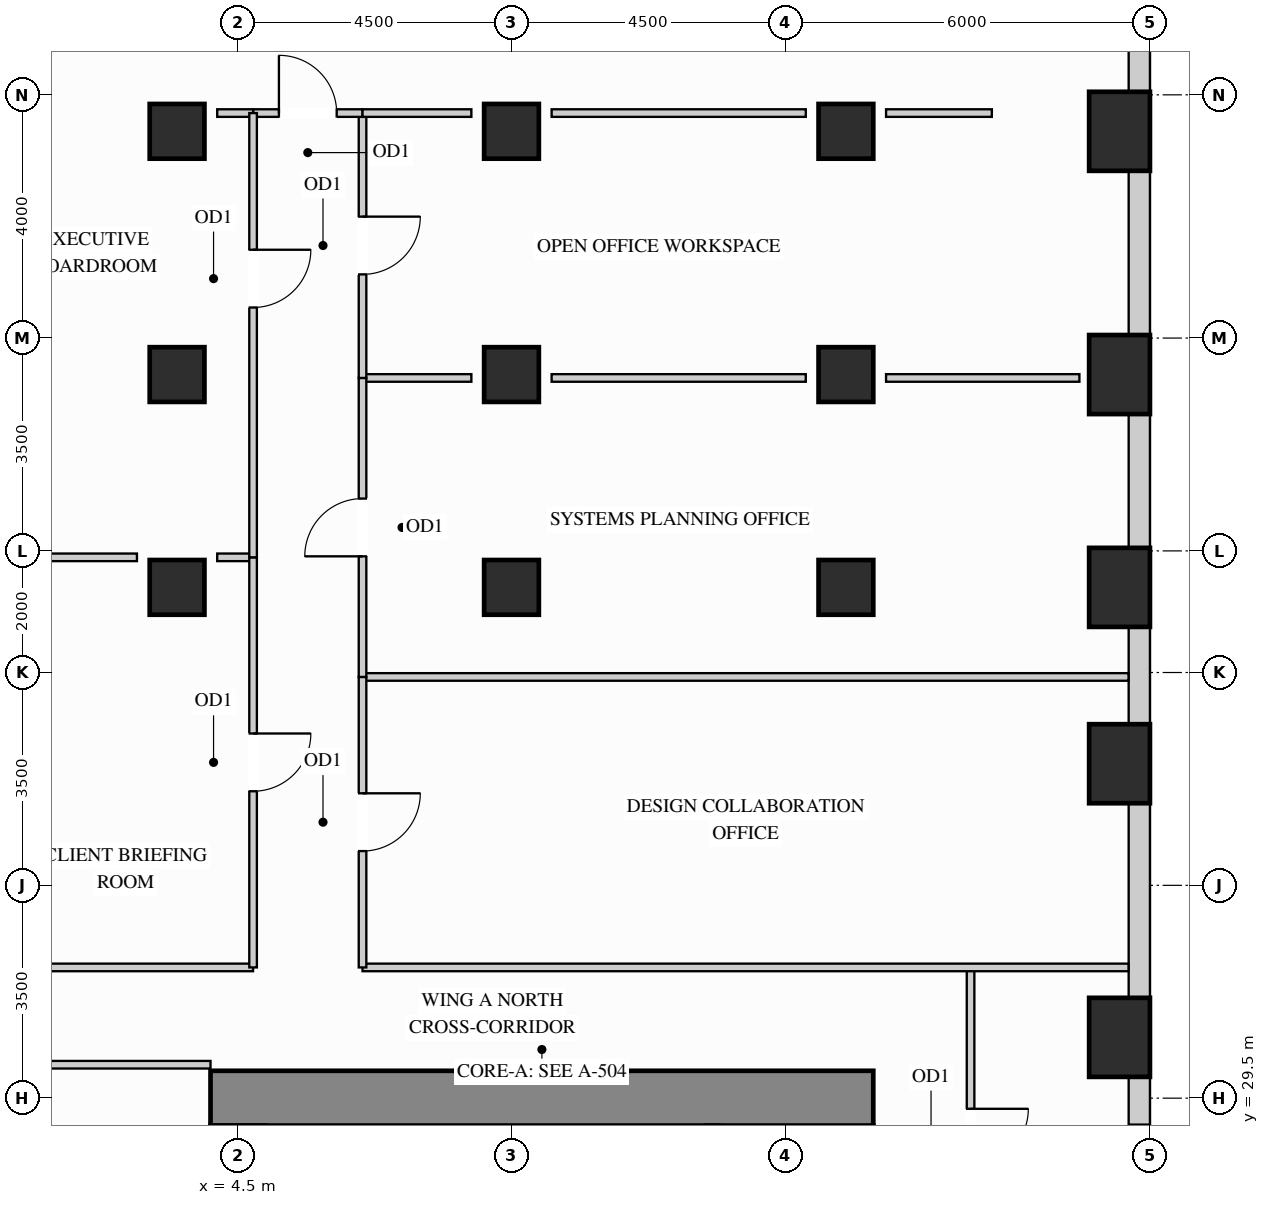
"""IFC4 building model, lengths in metres.
Left out: names, types, materials, properties, quantities, classifications, styles, units other than length and angle.
Written with IfcOpenShell. Run it as: python <this file> out.ifc"""

import sys

from ifc_helpers import new_model, si_unit, direction, frame, frame_2d, origin, origin_2d, place, context, subcontext, project, spatial, rectangle, extrude, source, transform, mapped, element, fill, save


model = new_model("IFC4")
c1 = context("Model", 3, precision=1e-05, world=origin(), true_north=direction((0.0, 1.0)))
c2 = subcontext(c1, "Body", "Model", "MODEL_VIEW")
j1 = project(units=[si_unit("LENGTHUNIT", "METRE"), si_unit("PLANEANGLEUNIT", "RADIAN")], contexts=[c1])
p1 = place(None, origin())
s1 = spatial("IfcSite", under=j1, at=p1, CompositionType="ELEMENT")
p2 = place(p1, origin())
s2 = spatial("IfcBuilding", under=s1, at=p2, CompositionType="ELEMENT")
p3 = place(p2, frame((0.0, 0.0, 65.7)))
s3 = spatial("IfcBuildingStorey", under=s2, at=p3, CompositionType="ELEMENT", Elevation=65.7)
m1 = source(origin(), c2, "Body", "SweptSolid", [
    extrude(rectangle(XDim=0.9, YDim=0.9, at=origin_2d()), origin(), (0.0, 0.0, 1.0), 3.38),
])
for number, where, z_axis, x_axis in (
    (1, (14.5, 37.9, 0.0), (0.0, 0.0, 1.0), (1.0, 0.0, 0.0)),
    (2, (14.5, 41.4, 0.0), (0.0, 0.0, 1.0), (1.0, 0.0, 0.0)),
    (3, (14.5, 45.4, 0.0), (0.0, 0.0, 1.0), (1.0, 0.0, 0.0)),
    (4, (3.5, 37.9, 0.0), (0.0, 0.0, 1.0), (1.0, 0.0, 0.0)),
    (5, (3.5, 41.4, 0.0), (0.0, 0.0, 1.0), (1.0, 0.0, 0.0)),
    (6, (3.5, 45.4, 0.0), (0.0, 0.0, 1.0), (1.0, 0.0, 0.0)),
    (7, (9.0, 37.9, 0.0), (0.0, 0.0, 1.0), (1.0, 0.0, 0.0)),
    (8, (9.0, 41.4, 0.0), (0.0, 0.0, 1.0), (1.0, 0.0, 0.0)),
    (9, (9.0, 45.4, 0.0), (0.0, 0.0, 1.0), (1.0, 0.0, 0.0)),
):
    element("IfcColumn", number, at=place(p3, frame(where, z_axis=z_axis, x_axis=x_axis)), inside=s3, PredefinedType="COLUMN", context=c2, shape_type="MappedRepresentation", body=[
        mapped(m1, transform((0.0, 0.0, 0.0), x_axis=(1.0, 0.0, 0.0), y_axis=(0.0, 1.0, 0.0), z_axis=(0.0, 0.0, 1.0))),
    ])
m2 = source(origin(), c2, "Body", "SweptSolid", [
    extrude(rectangle(XDim=1.0, YDim=1.3, at=origin_2d()), origin(), (0.0, 0.0, 1.0), 3.38),
])
for number, where, z_axis, x_axis in (
    (10, (19.0, 30.5, 0.0), (0.0, 0.0, 1.0), (1.0, 0.0, 0.0)),
    (11, (19.0, 35.0, 0.0), (0.0, 0.0, 1.0), (1.0, 0.0, 0.0)),
    (12, (19.0, 37.9, 0.0), (0.0, 0.0, 1.0), (1.0, 0.0, 0.0)),
    (13, (19.0, 41.4, 0.0), (0.0, 0.0, 1.0), (1.0, 0.0, 0.0)),
    (14, (19.0, 45.4, 0.0), (0.0, 0.0, 1.0), (1.0, 0.0, 0.0)),
):
    element("IfcColumn", number, at=place(p3, frame(where, z_axis=z_axis, x_axis=x_axis)), inside=s3, PredefinedType="COLUMN", context=c2, shape_type="MappedRepresentation", body=[
        mapped(m2, transform((0.0, 0.0, 0.0), x_axis=(1.0, 0.0, 0.0), y_axis=(0.0, 1.0, 0.0), z_axis=(0.0, 0.0, 1.0))),
    ])
m3 = source(origin(), c2, "Body", "SweptSolid", [
    extrude(rectangle(XDim=10.9, YDim=0.9, at=frame_2d((5.45, 0.0))), origin(), (0.0, 0.0, 1.0), 3.38),
])
p4 = place(p3, frame((4.05, 29.5, 0.0), z_axis=(0.0, 0.0, 1.0), x_axis=(1.0, 0.0, 0.0)))
e15 = element("IfcWall", 15, at=p4, inside=s3, PredefinedType="SHEAR", context=c2, shape_type="MappedRepresentation", body=[
    mapped(m3, transform((0.0, 0.0, 0.0), x_axis=(1.0, 0.0, 0.0), y_axis=(0.0, 1.0, 0.0), z_axis=(0.0, 0.0, 1.0))),
])
p5 = place(p3, frame((19.325, 27.448, 0.0), z_axis=(0.0, 0.0, 1.0), x_axis=(0.0, 1.0, 0.0)))
e16 = element("IfcWall", 16, at=p5, inside=s3, PredefinedType="SOLIDWALL", context=c2, shape_type="SweptSolid", body=[
    extrude(rectangle(XDim=2.404, YDim=0.35, at=frame_2d((1.202, 0.0))), origin(), (0.0, 0.0, 1.0), 2.51),
])
p6 = place(p5, frame((0.417, 0.0, 0.78)))
e17 = element("IfcOpeningElement", 17, at=p6, cuts=e16, PredefinedType="OPENING", context=c2, shape_type="SweptSolid", body=[
    extrude(rectangle(XDim=1.2, YDim=1.55, at=frame_2d((0.6, 0.775))), frame((0.0, 0.185, 0.0), z_axis=(0.0, -1.0, 0.0), x_axis=(1.0, 0.0, 0.0)), (0.0, 0.0, 1.0), 0.37),
])
m4 = source(origin(), c2, "Body", "SweptSolid", [
    extrude(rectangle(XDim=3.204, YDim=0.35, at=frame_2d((1.602, 0.0))), origin(), (0.0, 0.0, 1.0), 2.51),
])
p7 = place(p3, frame((19.325, 31.148, 0.0), z_axis=(0.0, 0.0, 1.0), x_axis=(0.0, 1.0, 0.0)))
e18 = element("IfcWall", 18, at=p7, inside=s3, PredefinedType="SOLIDWALL", context=c2, shape_type="MappedRepresentation", body=[
    mapped(m4, transform((0.0, 0.0, 0.0), x_axis=(1.0, 0.0, 0.0), y_axis=(0.0, 1.0, 0.0), z_axis=(0.0, 0.0, 1.0))),
])
m5 = source(origin(), c2, "Body", "SweptSolid", [
    extrude(rectangle(XDim=1.604, YDim=0.35, at=frame_2d((0.802, 0.0))), origin(), (0.0, 0.0, 1.0), 2.51),
])
p8 = place(p3, frame((19.325, 35.648, 0.0), z_axis=(0.0, 0.0, 1.0), x_axis=(0.0, 1.0, 0.0)))
e19 = element("IfcWall", 19, at=p8, inside=s3, PredefinedType="SOLIDWALL", context=c2, shape_type="MappedRepresentation", body=[
    mapped(m5, transform((0.0, 0.0, 0.0), x_axis=(1.0, 0.0, 0.0), y_axis=(0.0, 1.0, 0.0), z_axis=(0.0, 0.0, 1.0))),
])
m6 = source(origin(), c2, "Body", "SweptSolid", [
    extrude(rectangle(XDim=2.204, YDim=0.35, at=frame_2d((1.102, 0.0))), origin(), (0.0, 0.0, 1.0), 2.51),
])
p9 = place(p3, frame((19.325, 38.548, 0.0), z_axis=(0.0, 0.0, 1.0), x_axis=(0.0, 1.0, 0.0)))
e20 = element("IfcWall", 20, at=p9, inside=s3, PredefinedType="SOLIDWALL", context=c2, shape_type="MappedRepresentation", body=[
    mapped(m6, transform((0.0, 0.0, 0.0), x_axis=(1.0, 0.0, 0.0), y_axis=(0.0, 1.0, 0.0), z_axis=(0.0, 0.0, 1.0))),
])
m7 = source(origin(), c2, "Body", "SweptSolid", [
    extrude(rectangle(XDim=2.704, YDim=0.35, at=frame_2d((1.352, 0.0))), origin(), (0.0, 0.0, 1.0), 2.51),
])
p10 = place(p3, frame((19.325, 42.048, 0.0), z_axis=(0.0, 0.0, 1.0), x_axis=(0.0, 1.0, 0.0)))
e21 = element("IfcWall", 21, at=p10, inside=s3, PredefinedType="SOLIDWALL", context=c2, shape_type="MappedRepresentation", body=[
    mapped(m7, transform((0.0, 0.0, 0.0), x_axis=(1.0, 0.0, 0.0), y_axis=(0.0, 1.0, 0.0), z_axis=(0.0, 0.0, 1.0))),
])
m8 = source(origin(), c2, "Body", "SweptSolid", [
    extrude(rectangle(XDim=1.104, YDim=0.35, at=frame_2d((0.552, 0.0))), origin(), (0.0, 0.0, 1.0), 3.365),
])
p11 = place(p3, frame((19.325, 46.048, 0.0), z_axis=(0.0, 0.0, 1.0), x_axis=(0.0, 1.0, 0.0)))
e22 = element("IfcWall", 22, at=p11, inside=s3, PredefinedType="SOLIDWALL", context=c2, shape_type="MappedRepresentation", body=[
    mapped(m8, transform((0.0, 0.0, 0.0), x_axis=(1.0, 0.0, 0.0), y_axis=(0.0, 1.0, 0.0), z_axis=(0.0, 0.0, 1.0))),
])
p12 = place(p3, frame((16.55, 26.05, 0.0), z_axis=(0.0, 0.0, 1.0), x_axis=(0.0, 1.0, 0.0)))
e23 = element("IfcWall", 23, at=p12, inside=s3, PredefinedType="PARTITIONING", context=c2, shape_type="SweptSolid", body=[
    extrude(rectangle(XDim=5.6, YDim=0.125, at=frame_2d((2.8, 0.0))), origin(), (0.0, 0.0, 1.0), 3.365),
])
p13 = place(p12, frame((2.325, 0.0, 0.0)))
e24 = element("IfcOpeningElement", 24, at=p13, cuts=e23, PredefinedType="OPENING", context=c2, shape_type="SweptSolid", body=[
    extrude(rectangle(XDim=0.95, YDim=2.15, at=frame_2d((0.475, 1.075))), frame((0.0, 0.073, 0.0), z_axis=(0.0, -1.0, 0.0), x_axis=(1.0, 0.0, 0.0)), (0.0, 0.0, 1.0), 0.145),
])
m9 = source(origin(), c2, "Body", "SweptSolid", [
    extrude(rectangle(XDim=12.598, YDim=0.125, at=frame_2d((6.299, 0.0))), origin(), (0.0, 0.0, 1.0), 2.828),
])
p14 = place(p3, frame((6.55, 36.427, 0.0), z_axis=(0.0, 0.0, 1.0), x_axis=(1.0, 0.0, 0.0)))
e25 = element("IfcWall", 25, at=p14, inside=s3, PredefinedType="PARTITIONING", context=c2, shape_type="MappedRepresentation", body=[
    mapped(m9, transform((0.0, 0.0, 0.0), x_axis=(1.0, 0.0, 0.0), y_axis=(0.0, 1.0, 0.0), z_axis=(0.0, 0.0, 1.0))),
])
m10 = source(origin(), c2, "Body", "SweptSolid", [
    extrude(rectangle(XDim=1.79, YDim=0.125, at=frame_2d((0.895, 0.0))), origin(), (0.0, 0.0, 1.0), 2.67),
])
p15 = place(p3, frame((6.55, 41.344, 0.0), z_axis=(0.0, 0.0, 1.0), x_axis=(1.0, 0.0, 0.0)))
e26 = element("IfcWall", 26, at=p15, inside=s3, PredefinedType="PARTITIONING", context=c2, shape_type="MappedRepresentation", body=[
    mapped(m10, transform((0.0, 0.0, 0.0), x_axis=(1.0, 0.0, 0.0), y_axis=(0.0, 1.0, 0.0), z_axis=(0.0, 0.0, 1.0))),
])
m11 = source(origin(), c2, "Body", "SweptSolid", [
    extrude(rectangle(XDim=4.18, YDim=0.125, at=frame_2d((2.09, 0.0))), origin(), (0.0, 0.0, 1.0), 2.67),
])
p16 = place(p3, frame((9.66, 41.344, 0.0), z_axis=(0.0, 0.0, 1.0), x_axis=(1.0, 0.0, 0.0)))
e27 = element("IfcWall", 27, at=p16, inside=s3, PredefinedType="PARTITIONING", context=c2, shape_type="MappedRepresentation", body=[
    mapped(m11, transform((0.0, 0.0, 0.0), x_axis=(1.0, 0.0, 0.0), y_axis=(0.0, 1.0, 0.0), z_axis=(0.0, 0.0, 1.0))),
])
m12 = source(origin(), c2, "Body", "SweptSolid", [
    extrude(rectangle(XDim=3.18, YDim=0.125, at=frame_2d((1.59, 0.0))), origin(), (0.0, 0.0, 1.0), 2.67),
])
p17 = place(p3, frame((15.16, 41.344, 0.0), z_axis=(0.0, 0.0, 1.0), x_axis=(1.0, 0.0, 0.0)))
e28 = element("IfcWall", 28, at=p17, inside=s3, PredefinedType="PARTITIONING", context=c2, shape_type="MappedRepresentation", body=[
    mapped(m12, transform((0.0, 0.0, 0.0), x_axis=(1.0, 0.0, 0.0), y_axis=(0.0, 1.0, 0.0), z_axis=(0.0, 0.0, 1.0))),
])
p18 = place(p3, frame((6.55, 31.65, 0.0), z_axis=(0.0, 0.0, 1.0), x_axis=(1.0, 0.0, 0.0)))
e29 = element("IfcWall", 29, at=p18, inside=s3, PredefinedType="PARTITIONING", context=c2, shape_type="MappedRepresentation", body=[
    mapped(m9, transform((0.0, 0.0, 0.0), x_axis=(1.0, 0.0, 0.0), y_axis=(0.0, 1.0, 0.0), z_axis=(0.0, 0.0, 1.0))),
])
m13 = source(origin(), c2, "Body", "SweptSolid", [
    extrude(rectangle(XDim=4.398, YDim=0.125, at=frame_2d((2.199, 0.0))), origin(), (0.0, 0.0, 1.0), 2.828),
])
p19 = place(p3, frame((0.352, 31.65, 0.0), z_axis=(0.0, 0.0, 1.0), x_axis=(1.0, 0.0, 0.0)))
e30 = element("IfcWall", 30, at=p19, inside=s3, PredefinedType="PARTITIONING", context=c2, shape_type="MappedRepresentation", body=[
    mapped(m13, transform((0.0, 0.0, 0.0), x_axis=(1.0, 0.0, 0.0), y_axis=(0.0, 1.0, 0.0), z_axis=(0.0, 0.0, 1.0))),
])
m14 = source(origin(), c2, "Body", "SweptSolid", [
    extrude(rectangle(XDim=1.58, YDim=0.125, at=frame_2d((0.79, 0.0))), origin(), (0.0, 0.0, 1.0), 3.365),
])
p20 = place(p3, frame((1.26, 38.394, 0.0), z_axis=(0.0, 0.0, 1.0), x_axis=(1.0, 0.0, 0.0)))
e31 = element("IfcWall", 31, at=p20, inside=s3, PredefinedType="PARTITIONING", context=c2, shape_type="MappedRepresentation", body=[
    mapped(m14, transform((0.0, 0.0, 0.0), x_axis=(1.0, 0.0, 0.0), y_axis=(0.0, 1.0, 0.0), z_axis=(0.0, 0.0, 1.0))),
])
m15 = source(origin(), c2, "Body", "SweptSolid", [
    extrude(rectangle(XDim=0.59, YDim=0.125, at=frame_2d((0.295, 0.0))), origin(), (0.0, 0.0, 1.0), 3.365),
])
p21 = place(p3, frame((4.16, 38.394, 0.0), z_axis=(0.0, 0.0, 1.0), x_axis=(1.0, 0.0, 0.0)))
e32 = element("IfcWall", 32, at=p21, inside=s3, PredefinedType="PARTITIONING", context=c2, shape_type="MappedRepresentation", body=[
    mapped(m15, transform((0.0, 0.0, 0.0), x_axis=(1.0, 0.0, 0.0), y_axis=(0.0, 1.0, 0.0), z_axis=(0.0, 0.0, 1.0))),
])
m16 = source(origin(), c2, "Body", "SweptSolid", [
    extrude(rectangle(XDim=2.79, YDim=0.125, at=frame_2d((1.395, 0.0))), origin(), (0.0, 0.0, 1.0), 3.365),
])
p22 = place(p3, frame((1.26, 30.05, 0.0), z_axis=(0.0, 0.0, 1.0), x_axis=(1.0, 0.0, 0.0)))
e33 = element("IfcWall", 33, at=p22, inside=s3, PredefinedType="PARTITIONING", context=c2, shape_type="MappedRepresentation", body=[
    mapped(m16, transform((0.0, 0.0, 0.0), x_axis=(1.0, 0.0, 0.0), y_axis=(0.0, 1.0, 0.0), z_axis=(0.0, 0.0, 1.0))),
])
p23 = place(p3, frame((6.55, 31.65, 0.0), z_axis=(0.0, 0.0, 1.0), x_axis=(0.0, 1.0, 0.0)))
e34 = element("IfcWall", 34, at=p23, inside=s3, PredefinedType="PARTITIONING", context=c2, shape_type="SweptSolid", body=[
    extrude(rectangle(XDim=4.777, YDim=0.125, at=frame_2d((2.389, 0.0))), origin(), (0.0, 0.0, 1.0), 3.365),
])
p24 = place(p23, frame((1.914, 0.0, 0.0)))
e35 = element("IfcOpeningElement", 35, at=p24, cuts=e34, PredefinedType="OPENING", context=c2, shape_type="SweptSolid", body=[
    extrude(rectangle(XDim=0.95, YDim=2.15, at=frame_2d((0.475, 1.075))), frame((0.0, 0.073, 0.0), z_axis=(0.0, -1.0, 0.0), x_axis=(1.0, 0.0, 0.0)), (0.0, 0.0, 1.0), 0.145),
])
p25 = place(p3, frame((6.55, 36.427, 0.0), z_axis=(0.0, 0.0, 1.0), x_axis=(0.0, 1.0, 0.0)))
e36 = element("IfcWall", 36, at=p25, inside=s3, PredefinedType="PARTITIONING", context=c2, shape_type="SweptSolid", body=[
    extrude(rectangle(XDim=4.917, YDim=0.125, at=frame_2d((2.458, 0.0))), origin(), (0.0, 0.0, 1.0), 3.365),
])
p26 = place(p25, frame((1.983, 0.0, 0.0)))
e37 = element("IfcOpeningElement", 37, at=p26, cuts=e36, PredefinedType="OPENING", context=c2, shape_type="SweptSolid", body=[
    extrude(rectangle(XDim=0.95, YDim=2.15, at=frame_2d((0.475, 1.075))), frame((0.0, 0.073, 0.0), z_axis=(0.0, -1.0, 0.0), x_axis=(1.0, 0.0, 0.0)), (0.0, 0.0, 1.0), 0.145),
])
p27 = place(p3, frame((6.55, 41.344, 0.0), z_axis=(0.0, 0.0, 1.0), x_axis=(0.0, 1.0, 0.0)))
e38 = element("IfcWall", 38, at=p27, inside=s3, PredefinedType="PARTITIONING", context=c2, shape_type="SweptSolid", body=[
    extrude(rectangle(XDim=4.356, YDim=0.125, at=frame_2d((2.178, 0.0))), origin(), (0.0, 0.0, 1.0), 3.365),
])
p28 = place(p27, frame((1.703, 0.0, 0.0)))
e39 = element("IfcOpeningElement", 39, at=p28, cuts=e38, PredefinedType="OPENING", context=c2, shape_type="SweptSolid", body=[
    extrude(rectangle(XDim=0.95, YDim=2.15, at=frame_2d((0.475, 1.075))), frame((0.0, 0.073, 0.0), z_axis=(0.0, -1.0, 0.0), x_axis=(1.0, 0.0, 0.0)), (0.0, 0.0, 1.0), 0.145),
])
p29 = place(p3, frame((4.75, 45.7, 0.0), z_axis=(0.0, 0.0, 1.0), x_axis=(1.0, 0.0, 0.0)))
e40 = element("IfcWall", 40, at=p29, inside=s3, PredefinedType="PARTITIONING", context=c2, shape_type="SweptSolid", body=[
    extrude(rectangle(XDim=1.8, YDim=0.125, at=frame_2d((0.9, 0.0))), origin(), (0.0, 0.0, 1.0), 2.67),
])
p30 = place(p29, frame((0.425, 0.0, 0.0)))
e41 = element("IfcOpeningElement", 41, at=p30, cuts=e40, PredefinedType="OPENING", context=c2, shape_type="SweptSolid", body=[
    extrude(rectangle(XDim=0.95, YDim=2.15, at=frame_2d((0.475, 1.075))), frame((0.0, 0.073, 0.0), z_axis=(0.0, -1.0, 0.0), x_axis=(1.0, 0.0, 0.0)), (0.0, 0.0, 1.0), 0.145),
])
p31 = place(p3, frame((6.55, 45.7, 0.0), z_axis=(0.0, 0.0, 1.0), x_axis=(1.0, 0.0, 0.0)))
e42 = element("IfcWall", 42, at=p31, inside=s3, PredefinedType="PARTITIONING", context=c2, shape_type="MappedRepresentation", body=[
    mapped(m10, transform((0.0, 0.0, 0.0), x_axis=(1.0, 0.0, 0.0), y_axis=(0.0, 1.0, 0.0), z_axis=(0.0, 0.0, 1.0))),
])
p32 = place(p3, frame((9.66, 45.7, 0.0), z_axis=(0.0, 0.0, 1.0), x_axis=(1.0, 0.0, 0.0)))
e43 = element("IfcWall", 43, at=p32, inside=s3, PredefinedType="PARTITIONING", context=c2, shape_type="MappedRepresentation", body=[
    mapped(m11, transform((0.0, 0.0, 0.0), x_axis=(1.0, 0.0, 0.0), y_axis=(0.0, 1.0, 0.0), z_axis=(0.0, 0.0, 1.0))),
])
m17 = source(origin(), c2, "Body", "SweptSolid", [
    extrude(rectangle(XDim=1.74, YDim=0.125, at=frame_2d((0.87, 0.0))), origin(), (0.0, 0.0, 1.0), 2.67),
])
p33 = place(p3, frame((15.16, 45.7, 0.0), z_axis=(0.0, 0.0, 1.0), x_axis=(1.0, 0.0, 0.0)))
e44 = element("IfcWall", 44, at=p33, inside=s3, PredefinedType="PARTITIONING", context=c2, shape_type="MappedRepresentation", body=[
    mapped(m17, transform((0.0, 0.0, 0.0), x_axis=(1.0, 0.0, 0.0), y_axis=(0.0, 1.0, 0.0), z_axis=(0.0, 0.0, 1.0))),
])
m18 = source(origin(), c2, "Body", "SweptSolid", [
    extrude(rectangle(XDim=0.59, YDim=0.125, at=frame_2d((0.295, 0.0))), origin(), (0.0, 0.0, 1.0), 2.67),
])
p34 = place(p3, frame((4.16, 45.7, 0.0), z_axis=(0.0, 0.0, 1.0), x_axis=(1.0, 0.0, 0.0)))
e45 = element("IfcWall", 45, at=p34, inside=s3, PredefinedType="PARTITIONING", context=c2, shape_type="MappedRepresentation", body=[
    mapped(m18, transform((0.0, 0.0, 0.0), x_axis=(1.0, 0.0, 0.0), y_axis=(0.0, 1.0, 0.0), z_axis=(0.0, 0.0, 1.0))),
])
p35 = place(p3, frame((4.75, 31.65, 0.0), z_axis=(0.0, 0.0, 1.0), x_axis=(0.0, 1.0, 0.0)))
e46 = element("IfcWall", 46, at=p35, inside=s3, PredefinedType="PARTITIONING", context=c2, shape_type="SweptSolid", body=[
    extrude(rectangle(XDim=6.744, YDim=0.125, at=frame_2d((3.372, 0.0))), origin(), (0.0, 0.0, 1.0), 3.365),
])
p36 = place(p35, frame((2.897, 0.0, 0.0)))
e47 = element("IfcOpeningElement", 47, at=p36, cuts=e46, PredefinedType="OPENING", context=c2, shape_type="SweptSolid", body=[
    extrude(rectangle(XDim=0.95, YDim=2.15, at=frame_2d((0.475, 1.075))), frame((0.0, 0.073, 0.0), z_axis=(0.0, -1.0, 0.0), x_axis=(1.0, 0.0, 0.0)), (0.0, 0.0, 1.0), 0.145),
])
p37 = place(p3, frame((4.75, 38.394, 0.0), z_axis=(0.0, 0.0, 1.0), x_axis=(0.0, 1.0, 0.0)))
e48 = element("IfcWall", 48, at=p37, inside=s3, PredefinedType="PARTITIONING", context=c2, shape_type="SweptSolid", body=[
    extrude(rectangle(XDim=7.306, YDim=0.125, at=frame_2d((3.653, 0.0))), origin(), (0.0, 0.0, 1.0), 3.365),
])
p38 = place(p37, frame((4.108, 0.0, 0.0)))
e49 = element("IfcOpeningElement", 49, at=p38, cuts=e48, PredefinedType="OPENING", context=c2, shape_type="SweptSolid", body=[
    extrude(rectangle(XDim=0.95, YDim=2.15, at=frame_2d((0.475, 1.075))), frame((0.0, 0.073, 0.0), z_axis=(0.0, -1.0, 0.0), x_axis=(1.0, 0.0, 0.0)), (0.0, 0.0, 1.0), 0.145),
])
m19 = source(origin(), c2, "Body", "SweptSolid", [
    extrude(rectangle(XDim=0.95, YDim=2.15, at=frame_2d((0.475, 1.075))), frame((0.0, 0.025, 0.0), z_axis=(0.0, -1.0, 0.0), x_axis=(1.0, 0.0, 0.0)), (0.0, 0.0, 1.0), 0.05),
])
p39 = place(p13, origin())
e50 = element("IfcDoor", 50, at=p39, inside=s3, OperationType="SINGLE_SWING_RIGHT", PredefinedType="DOOR", context=c2, shape_type="MappedRepresentation", body=[
    mapped(m19, transform((0.0, 0.0, 0.0), x_axis=(1.0, 0.0, 0.0), y_axis=(0.0, 1.0, 0.0), z_axis=(0.0, 0.0, 1.0))),
])
fill(e24, e50)
p40 = place(p24, origin())
e51 = element("IfcDoor", 51, at=p40, inside=s3, OperationType="SINGLE_SWING_RIGHT", PredefinedType="DOOR", context=c2, shape_type="MappedRepresentation", body=[
    mapped(m19, transform((0.0, 0.0, 0.0), x_axis=(1.0, 0.0, 0.0), y_axis=(0.0, 1.0, 0.0), z_axis=(0.0, 0.0, 1.0))),
])
fill(e35, e51)
p41 = place(p26, origin())
e52 = element("IfcDoor", 52, at=p41, inside=s3, OperationType="SINGLE_SWING_LEFT", PredefinedType="DOOR", context=c2, shape_type="MappedRepresentation", body=[
    mapped(m19, transform((0.0, 0.0, 0.0), x_axis=(1.0, 0.0, 0.0), y_axis=(0.0, 1.0, 0.0), z_axis=(0.0, 0.0, 1.0))),
])
fill(e37, e52)
p42 = place(p28, origin())
e53 = element("IfcDoor", 53, at=p42, inside=s3, OperationType="SINGLE_SWING_RIGHT", PredefinedType="DOOR", context=c2, shape_type="MappedRepresentation", body=[
    mapped(m19, transform((0.0, 0.0, 0.0), x_axis=(1.0, 0.0, 0.0), y_axis=(0.0, 1.0, 0.0), z_axis=(0.0, 0.0, 1.0))),
])
fill(e39, e53)
p43 = place(p30, origin())
e54 = element("IfcDoor", 54, at=p43, inside=s3, OperationType="SINGLE_SWING_LEFT", PredefinedType="DOOR", context=c2, shape_type="MappedRepresentation", body=[
    mapped(m19, transform((0.0, 0.0, 0.0), x_axis=(1.0, 0.0, 0.0), y_axis=(0.0, 1.0, 0.0), z_axis=(0.0, 0.0, 1.0))),
])
fill(e41, e54)
p44 = place(p36, origin())
e55 = element("IfcDoor", 55, at=p44, inside=s3, OperationType="SINGLE_SWING_RIGHT", PredefinedType="DOOR", context=c2, shape_type="MappedRepresentation", body=[
    mapped(m19, transform((0.0, 0.0, 0.0), x_axis=(1.0, 0.0, 0.0), y_axis=(0.0, 1.0, 0.0), z_axis=(0.0, 0.0, 1.0))),
])
fill(e47, e55)
p45 = place(p38, origin())
e56 = element("IfcDoor", 56, at=p45, inside=s3, OperationType="SINGLE_SWING_RIGHT", PredefinedType="DOOR", context=c2, shape_type="MappedRepresentation", body=[
    mapped(m19, transform((0.0, 0.0, 0.0), x_axis=(1.0, 0.0, 0.0), y_axis=(0.0, 1.0, 0.0), z_axis=(0.0, 0.0, 1.0))),
])
fill(e49, e56)
m20 = source(origin(), c2, "Body", "SweptSolid", [
    extrude(rectangle(XDim=1.2, YDim=1.55, at=frame_2d((0.6, 0.775))), frame((0.0, 0.03, 0.0), z_axis=(0.0, -1.0, 0.0), x_axis=(1.0, 0.0, 0.0)), (0.0, 0.0, 1.0), 0.06),
])
p46 = place(p6, origin())
e57 = element("IfcWindow", 57, at=p46, inside=s3, PartitioningType="SINGLE_PANEL", PredefinedType="WINDOW", context=c2, shape_type="MappedRepresentation", body=[
    mapped(m20, transform((0.0, 0.0, 0.0), x_axis=(1.0, 0.0, 0.0), y_axis=(0.0, 1.0, 0.0), z_axis=(0.0, 0.0, 1.0))),
])
fill(e17, e57)
save(model, sys.argv[1])
